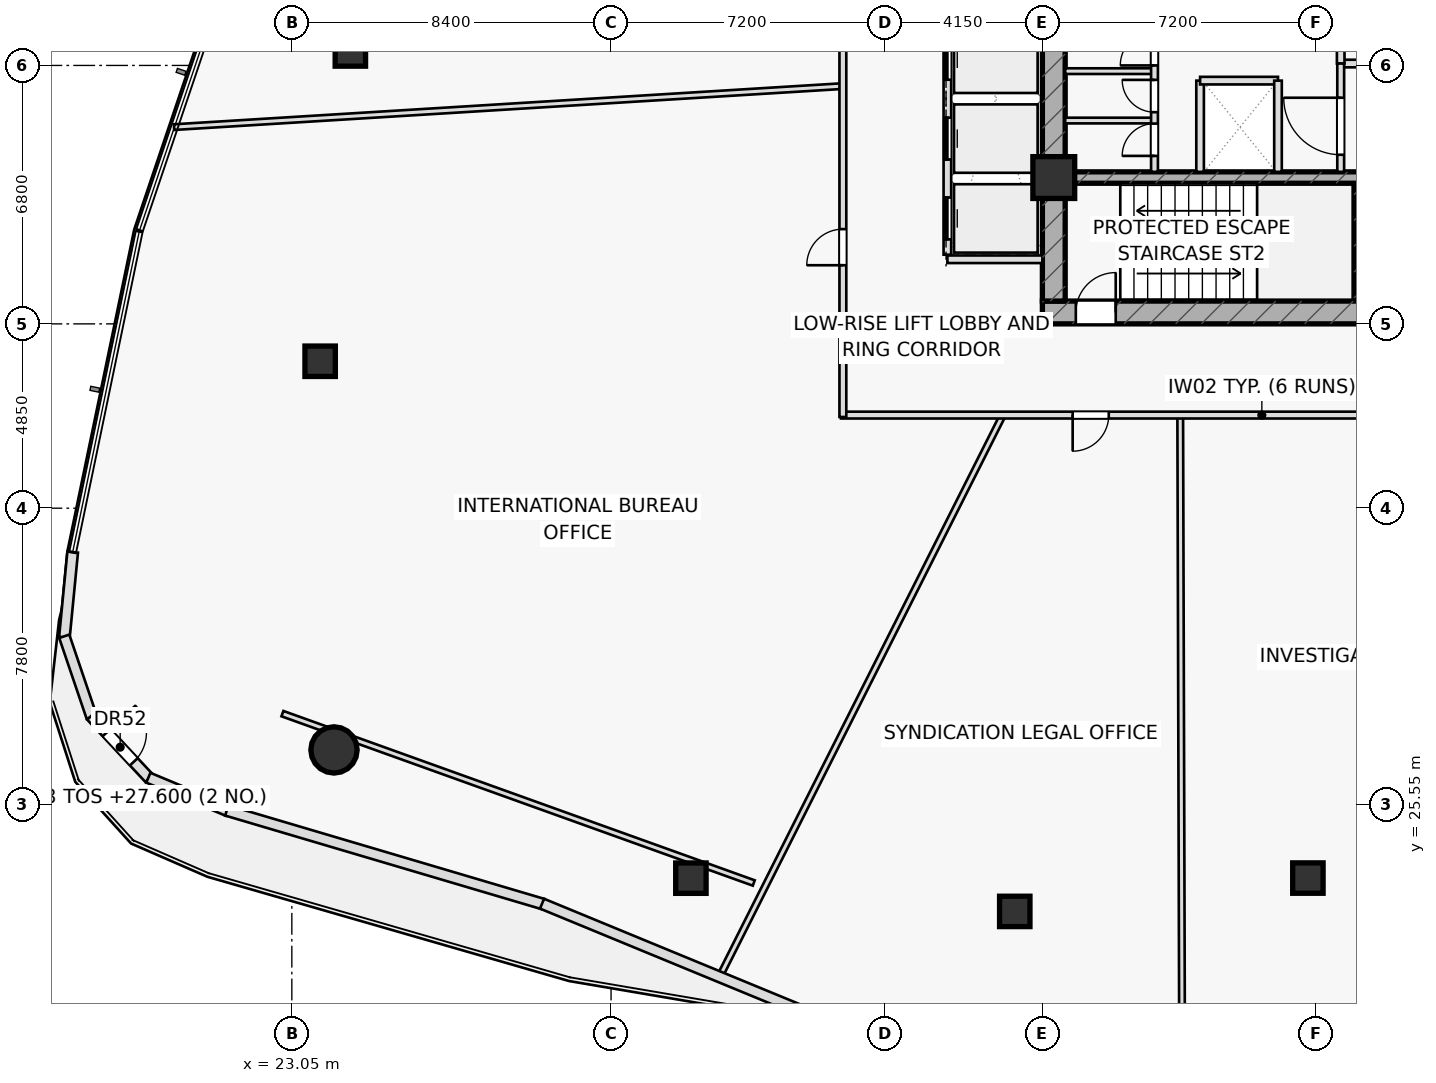
"""IFC4 building model, lengths in metres.
Left out: names, types, materials, properties, quantities, classifications, styles, units other than length and angle.
Written with IfcOpenShell. Run it as: python <this file> out.ifc"""

import sys

from ifc_helpers import new_model, si_unit, direction, frame, frame_2d, origin, origin_2d, place, context, subcontext, project, spatial, rectangle, hollow_rectangle, hollow_circle, extrude, element, fill, save


model = new_model("IFC4")
c1 = context("Model", 3, precision=1e-05, world=origin(), true_north=direction((0.0, 1.0)))
c2 = subcontext(c1, "Body", "Model", "MODEL_VIEW")
j1 = project(units=[si_unit("LENGTHUNIT", "METRE"), si_unit("PLANEANGLEUNIT", "RADIAN")], contexts=[c1])
p1 = place(None, origin())
s1 = spatial("IfcSite", under=j1, at=p1, CompositionType="ELEMENT")
p2 = place(p1, origin())
s2 = spatial("IfcBuilding", under=s1, at=p2, CompositionType="ELEMENT")
p3 = place(p2, frame((0.0, 0.0, 27.6)))
s3 = spatial("IfcBuildingStorey", under=s2, at=p3, CompositionType="ELEMENT", Elevation=27.6)
p4 = place(p3, frame((51.11, 38.8, 0.0), z_axis=(0.0, 0.0, 1.0), x_axis=(0.0, 1.0, 0.0)))
e1 = element("IfcWall", 1, at=p4, inside=s3, PredefinedType="SHEAR", context=c2, shape_type="SweptSolid", body=[
    extrude(rectangle(XDim=3.1, YDim=0.22, at=frame_2d((1.55, 0.0))), origin(), (0.0, 0.0, 1.0), 3.6),
])
p5 = place(p3, frame((42.8, 38.5, 0.0), z_axis=(0.0, 0.0, 1.0), x_axis=(1.0, 0.0, 0.0)))
e2 = element("IfcWall", 2, at=p5, inside=s3, PredefinedType="SHEAR", context=c2, shape_type="SweptSolid", body=[
    extrude(rectangle(XDim=14.4, YDim=0.6, at=frame_2d((7.2, 0.0))), origin(), (0.0, 0.0, 1.0), 3.6),
])
p6 = place(p5, frame((0.88, 0.0, 0.0)))
e3 = element("IfcOpeningElement", 3, at=p6, cuts=e2, PredefinedType="OPENING", context=c2, shape_type="SweptSolid", body=[
    extrude(rectangle(XDim=1.05, YDim=2.2, at=frame_2d((0.525, 1.1))), frame((0.0, 0.31, 0.0), z_axis=(0.0, -1.0, 0.0), x_axis=(1.0, 0.0, 0.0)), (0.0, 0.0, 1.0), 0.62),
])
p7 = place(p3, frame((43.1, 38.8, 0.0), z_axis=(0.0, 0.0, 1.0), x_axis=(0.0, 1.0, 0.0)))
e4 = element("IfcWall", 4, at=p7, inside=s3, PredefinedType="SHEAR", context=c2, shape_type="SweptSolid", body=[
    extrude(rectangle(XDim=12.4, YDim=0.6, at=frame_2d((6.2, 0.0))), origin(), (0.0, 0.0, 1.0), 3.6),
])
p8 = place(p3, frame((43.4, 42.05, 0.0), z_axis=(0.0, 0.0, 1.0), x_axis=(1.0, 0.0, 0.0)))
e5 = element("IfcWall", 5, at=p8, inside=s3, PredefinedType="SHEAR", context=c2, shape_type="SweptSolid", body=[
    extrude(rectangle(XDim=13.2, YDim=0.3, at=frame_2d((6.6, 0.0))), origin(), (0.0, 0.0, 1.0), 3.6),
])
p9 = place(p3, frame((43.1, 42.05, 0.0), z_axis=(0.0, 0.0, 1.0), x_axis=(1.0, 0.0, 0.0)))
e6 = element("IfcColumn", 6, at=p9, inside=s3, PredefinedType="COLUMN", context=c2, shape_type="SweptSolid", body=[
    extrude(rectangle(XDim=1.1, YDim=1.1, at=origin_2d()), origin(), (0.0, 0.0, 1.0), 3.6),
])
for number, where, z_axis, x_axis in (
    (7, (24.59, 45.381, 0.0), (0.0, 0.0, 1.0), (1.0, 0.0, 0.0)),
    (8, (23.795, 37.216, 0.0), (0.0, 0.0, 1.0), (1.0, 0.0, 0.0)),
):
    element("IfcColumn", number, at=place(p3, frame(where, z_axis=z_axis, x_axis=x_axis)), inside=s3, PredefinedType="COLUMN", context=c2, shape_type="SweptSolid", body=[
        extrude(hollow_rectangle(XDim=0.8, YDim=0.8, WallThickness=0.045, at=origin_2d()), origin(), (0.0, 0.0, 1.0), 3.6),
    ])
p10 = place(p3, frame((24.159, 26.99, 0.0), z_axis=(0.0, 0.0, 1.0), x_axis=(1.0, 0.0, 0.0)))
e9 = element("IfcColumn", 9, at=p10, inside=s3, PredefinedType="COLUMN", context=c2, shape_type="SweptSolid", body=[
    extrude(hollow_circle(Radius=0.61, WallThickness=0.05, at=origin_2d()), origin(), (0.0, 0.0, 1.0), 3.6),
])
for number, where, z_axis, x_axis in (
    (10, (33.551, 23.615, 0.0), (0.0, 0.0, 1.0), (1.0, 0.0, 0.0)),
    (11, (42.073, 22.74, 0.0), (0.0, 0.0, 1.0), (1.0, 0.0, 0.0)),
    (12, (49.787, 23.618, 0.0), (0.0, 0.0, 1.0), (1.0, 0.0, 0.0)),
):
    element("IfcColumn", number, at=place(p3, frame(where, z_axis=z_axis, x_axis=x_axis)), inside=s3, PredefinedType="COLUMN", context=c2, shape_type="SweptSolid", body=[
        extrude(hollow_rectangle(XDim=0.8, YDim=0.8, WallThickness=0.045, at=origin_2d()), origin(), (0.0, 0.0, 1.0), 3.6),
    ])
p11 = place(p3, frame((40.3, 39.9, 0.0), z_axis=(0.0, 0.0, 1.0), x_axis=(1.0, 0.0, 0.0)))
e13 = element("IfcWall", 13, at=p11, inside=s3, PredefinedType="PARTITIONING", context=c2, shape_type="SweptSolid", body=[
    extrude(rectangle(XDim=2.5, YDim=0.2, at=frame_2d((1.25, 0.0))), origin(), (0.0, 0.0, 1.0), 3.6),
])
p12 = place(p3, frame((46.95, 42.2, 0.0), z_axis=(0.0, 0.0, 1.0), x_axis=(0.0, 1.0, 0.0)))
e14 = element("IfcWall", 14, at=p12, inside=s3, PredefinedType="PARTITIONING", context=c2, shape_type="SweptSolid", body=[
    extrude(rectangle(XDim=2.4, YDim=0.2, at=frame_2d((1.2, 0.0))), origin(), (0.0, 0.0, 1.0), 3.6),
])
p13 = place(p3, frame((46.95, 44.6, 0.0), z_axis=(0.0, 0.0, 1.0), x_axis=(1.0, 0.0, 0.0)))
e15 = element("IfcWall", 15, at=p13, inside=s3, PredefinedType="PARTITIONING", context=c2, shape_type="SweptSolid", body=[
    extrude(rectangle(XDim=2.05, YDim=0.2, at=frame_2d((1.025, 0.0))), origin(), (0.0, 0.0, 1.0), 3.6),
])
p14 = place(p3, frame((50.65, 45.05, 0.0), z_axis=(0.0, 0.0, 1.0), x_axis=(1.0, 0.0, 0.0)))
e16 = element("IfcWall", 16, at=p14, inside=s3, PredefinedType="PARTITIONING", context=c2, shape_type="SweptSolid", body=[
    extrude(rectangle(XDim=5.95, YDim=0.2, at=frame_2d((2.975, 0.0))), origin(), (0.0, 0.0, 1.0), 3.6),
])
p15 = place(p14, frame((1.35, 0.0, 0.0)))
e17 = element("IfcOpeningElement", 17, at=p15, cuts=e16, PredefinedType="OPENING", context=c2, shape_type="SweptSolid", body=[
    extrude(rectangle(XDim=1.5, YDim=2.2, at=frame_2d((0.75, 1.1))), frame((0.0, 0.11, 0.0), z_axis=(0.0, -1.0, 0.0), x_axis=(1.0, 0.0, 0.0)), (0.0, 0.0, 1.0), 0.22),
])
p16 = place(p3, frame((50.65, 45.05, 0.0), z_axis=(0.0, 0.0, 1.0), x_axis=(0.0, 1.0, 0.0)))
e18 = element("IfcWall", 18, at=p16, inside=s3, PredefinedType="PARTITIONING", context=c2, shape_type="SweptSolid", body=[
    extrude(rectangle(XDim=2.75, YDim=0.2, at=frame_2d((1.375, 0.0))), origin(), (0.0, 0.0, 1.0), 3.6),
])
p17 = place(p3, frame((50.65, 42.2, 0.0), z_axis=(0.0, 0.0, 1.0), x_axis=(0.0, 1.0, 0.0)))
e19 = element("IfcWall", 19, at=p17, inside=s3, PredefinedType="PARTITIONING", context=c2, shape_type="SweptSolid", body=[
    extrude(rectangle(XDim=2.85, YDim=0.18, at=frame_2d((1.425, 0.0))), origin(), (0.0, 0.0, 1.0), 3.6),
])
p18 = place(p17, frame((0.45, 0.0, 0.0)))
e20 = element("IfcOpeningElement", 20, at=p18, cuts=e19, PredefinedType="OPENING", context=c2, shape_type="SweptSolid", body=[
    extrude(rectangle(XDim=1.5, YDim=2.2, at=frame_2d((0.75, 1.1))), frame((0.0, 0.1, 0.0), z_axis=(0.0, -1.0, 0.0), x_axis=(1.0, 0.0, 0.0)), (0.0, 0.0, 1.0), 0.2),
])
for number, where, z_axis, x_axis in (
    (21, (43.4, 43.55, 0.0), (0.0, 0.0, 1.0), (1.0, 0.0, 0.0)),
    (22, (43.4, 44.85, 0.0), (0.0, 0.0, 1.0), (1.0, 0.0, 0.0)),
):
    element("IfcWall", number, at=place(p3, frame(where, z_axis=z_axis, x_axis=x_axis)), inside=s3, PredefinedType="PARTITIONING", context=c2, shape_type="SweptSolid", body=[
        extrude(rectangle(XDim=2.35, YDim=0.15, at=frame_2d((1.175, 0.0))), origin(), (0.0, 0.0, 1.0), 3.6),
    ])
p19 = place(p3, frame((45.75, 42.2, 0.0), z_axis=(0.0, 0.0, 1.0), x_axis=(0.0, 1.0, 0.0)))
e23 = element("IfcWall", 23, at=p19, inside=s3, PredefinedType="PARTITIONING", context=c2, shape_type="SweptSolid", body=[
    extrude(rectangle(XDim=5.6, YDim=0.18, at=frame_2d((2.8, 0.0))), origin(), (0.0, 0.0, 1.0), 3.6),
])
p20 = place(p19, frame((0.42, 0.0, 0.0)))
e24 = element("IfcOpeningElement", 24, at=p20, cuts=e23, PredefinedType="OPENING", context=c2, shape_type="SweptSolid", body=[
    extrude(rectangle(XDim=0.85, YDim=2.05, at=frame_2d((0.425, 1.025))), frame((0.0, 0.1, 0.0), z_axis=(0.0, -1.0, 0.0), x_axis=(1.0, 0.0, 0.0)), (0.0, 0.0, 1.0), 0.2),
])
p21 = place(p19, frame((1.57, 0.0, 0.0)))
e25 = element("IfcOpeningElement", 25, at=p21, cuts=e23, PredefinedType="OPENING", context=c2, shape_type="SweptSolid", body=[
    extrude(rectangle(XDim=0.85, YDim=2.05, at=frame_2d((0.425, 1.025))), frame((0.0, 0.1, 0.0), z_axis=(0.0, -1.0, 0.0), x_axis=(1.0, 0.0, 0.0)), (0.0, 0.0, 1.0), 0.2),
])
p22 = place(p19, frame((2.8, 0.0, 0.0)))
e26 = element("IfcOpeningElement", 26, at=p22, cuts=e23, PredefinedType="OPENING", context=c2, shape_type="SweptSolid", body=[
    extrude(rectangle(XDim=0.9, YDim=2.05, at=frame_2d((0.45, 1.025))), frame((0.0, 0.1, 0.0), z_axis=(0.0, -1.0, 0.0), x_axis=(1.0, 0.0, 0.0)), (0.0, 0.0, 1.0), 0.2),
])
p23 = place(p3, frame((22.802, 27.945, 0.0), z_axis=(0.0, 0.0, 1.0), x_axis=(0.941102349209, -0.338121824662, 0.0)))
e27 = element("IfcWall", 27, at=p23, inside=s3, PredefinedType="PARTITIONING", context=c2, shape_type="SweptSolid", body=[
    extrude(rectangle(XDim=13.18, YDim=0.15, at=frame_2d((6.59, 0.0))), origin(), (0.0, 0.0, 1.0), 2.925),
])
p24 = place(p3, frame((37.55, 44.457, 0.0), z_axis=(0.0, 0.0, 1.0), x_axis=(-0.998123200765, -0.061237864879, 0.0)))
e28 = element("IfcWall", 28, at=p24, inside=s3, PredefinedType="PARTITIONING", context=c2, shape_type="SweptSolid", body=[
    extrude(rectangle(XDim=17.634, YDim=0.15, at=frame_2d((8.817, 0.0))), origin(), (0.0, 0.0, 1.0), 2.975),
])
p25 = place(p3, frame((41.76, 35.8, 0.0), z_axis=(0.0, 0.0, 1.0), x_axis=(-0.450299979732, -0.892877331022, 0.0)))
e29 = element("IfcWall", 29, at=p25, inside=s3, PredefinedType="PARTITIONING", context=c2, shape_type="SweptSolid", body=[
    extrude(rectangle(XDim=16.566, YDim=0.15, at=frame_2d((8.283, 0.0))), origin(), (0.0, 0.0, 1.0), 2.975),
])
p26 = place(p3, frame((46.427, 35.8, 0.0), z_axis=(0.0, 0.0, 1.0), x_axis=(0.002955422619, -0.999995632729, 0.0)))
e30 = element("IfcWall", 30, at=p26, inside=s3, PredefinedType="PARTITIONING", context=c2, shape_type="SweptSolid", body=[
    extrude(rectangle(XDim=16.769, YDim=0.15, at=frame_2d((8.385, 0.0))), origin(), (0.0, 0.0, 1.0), 2.925),
])
p27 = place(p3, frame((59.65, 35.8, 0.0), z_axis=(0.0, 0.0, 1.0), x_axis=(-1.0, 0.0, 0.0)))
e31 = element("IfcWall", 31, at=p27, inside=s3, PredefinedType="PARTITIONING", context=c2, shape_type="SweptSolid", body=[
    extrude(rectangle(XDim=22.15, YDim=0.18, at=frame_2d((11.075, 0.0))), origin(), (0.0, 0.0, 1.0), 2.925),
])
p28 = place(p27, frame((6.254, 0.0, 0.0)))
e32 = element("IfcOpeningElement", 32, at=p28, cuts=e31, PredefinedType="OPENING", context=c2, shape_type="SweptSolid", body=[
    extrude(rectangle(XDim=0.95, YDim=2.05, at=frame_2d((0.475, 1.025))), frame((0.0, 0.1, 0.0), z_axis=(0.0, -1.0, 0.0), x_axis=(1.0, 0.0, 0.0)), (0.0, 0.0, 1.0), 0.2),
])
p29 = place(p27, frame((15.103, 0.0, 0.0)))
e33 = element("IfcOpeningElement", 33, at=p29, cuts=e31, PredefinedType="OPENING", context=c2, shape_type="SweptSolid", body=[
    extrude(rectangle(XDim=0.95, YDim=2.05, at=frame_2d((0.475, 1.025))), frame((0.0, 0.1, 0.0), z_axis=(0.0, -1.0, 0.0), x_axis=(1.0, 0.0, 0.0)), (0.0, 0.0, 1.0), 0.2),
])
p30 = place(p3, frame((37.55, 35.75, 0.0), z_axis=(0.0, 0.0, 1.0), x_axis=(0.0, 1.0, 0.0)))
e34 = element("IfcWall", 34, at=p30, inside=s3, PredefinedType="PARTITIONING", context=c2, shape_type="SweptSolid", body=[
    extrude(rectangle(XDim=12.75, YDim=0.18, at=frame_2d((6.375, 0.0))), origin(), (0.0, 0.0, 1.0), 2.925),
])
p31 = place(p30, frame((3.993, 0.0, 0.0)))
e35 = element("IfcOpeningElement", 35, at=p31, cuts=e34, PredefinedType="OPENING", context=c2, shape_type="SweptSolid", body=[
    extrude(rectangle(XDim=0.95, YDim=2.05, at=frame_2d((0.475, 1.025))), frame((0.0, 0.1, 0.0), z_axis=(0.0, -1.0, 0.0), x_axis=(1.0, 0.0, 0.0)), (0.0, 0.0, 1.0), 0.2),
])
p32 = place(p30, frame((10.132, 0.0, 0.0)))
e36 = element("IfcOpeningElement", 36, at=p32, cuts=e34, PredefinedType="OPENING", context=c2, shape_type="SweptSolid", body=[
    extrude(rectangle(XDim=0.95, YDim=2.05, at=frame_2d((0.475, 1.025))), frame((0.0, 0.1, 0.0), z_axis=(0.0, -1.0, 0.0), x_axis=(1.0, 0.0, 0.0)), (0.0, 0.0, 1.0), 0.2),
])
p33 = place(p3, frame((17.283, 32.194, 0.0), z_axis=(0.0, 0.0, 1.0), x_axis=(-0.096704884941, -0.995313099094, 0.0)))
e37 = element("IfcWall", 37, at=p33, inside=s3, PredefinedType="STANDARD", context=c2, shape_type="SweptSolid", body=[
    extrude(rectangle(XDim=2.254, YDim=0.28, at=frame_2d((1.127, 0.0))), origin(), (0.0, 0.0, 1.0), 3.6),
])
p34 = place(p3, frame((17.062, 29.979, 0.0), z_axis=(0.0, 0.0, 1.0), x_axis=(0.321447996394, -0.946927233537, 0.0)))
e38 = element("IfcWall", 38, at=p34, inside=s3, PredefinedType="STANDARD", context=c2, shape_type="SweptSolid", body=[
    extrude(rectangle(XDim=2.243, YDim=0.28, at=frame_2d((1.122, 0.0))), origin(), (0.0, 0.0, 1.0), 3.6),
])
p35 = place(p3, frame((17.767, 27.881, 0.0), z_axis=(0.0, 0.0, 1.0), x_axis=(0.682698223225, -0.730700442045, 0.0)))
e39 = element("IfcWall", 39, at=p35, inside=s3, PredefinedType="STANDARD", context=c2, shape_type="SweptSolid", body=[
    extrude(rectangle(XDim=2.243, YDim=0.28, at=frame_2d((1.122, 0.0))), origin(), (0.0, 0.0, 1.0), 3.6),
])
p36 = place(p35, frame((0.596, 0.0, 0.0)))
e40 = element("IfcOpeningElement", 40, at=p36, cuts=e39, PredefinedType="OPENING", context=c2, shape_type="SweptSolid", body=[
    extrude(rectangle(XDim=1.05, YDim=2.2, at=frame_2d((0.525, 1.1))), frame((0.0, 0.15, 0.0), z_axis=(0.0, -1.0, 0.0), x_axis=(1.0, 0.0, 0.0)), (0.0, 0.0, 1.0), 0.3),
])
p37 = place(p3, frame((19.274, 26.259, 0.0), z_axis=(0.0, 0.0, 1.0), x_axis=(0.92284399396, -0.385173938387, 0.0)))
e41 = element("IfcWall", 41, at=p37, inside=s3, PredefinedType="STANDARD", context=c2, shape_type="SweptSolid", body=[
    extrude(rectangle(XDim=2.265, YDim=0.28, at=frame_2d((1.133, 0.0))), origin(), (0.0, 0.0, 1.0), 3.6),
])
p38 = place(p3, frame((21.337, 25.396, 0.0), z_axis=(0.0, 0.0, 1.0), x_axis=(0.958933609462, -0.283630627127, 0.0)))
e42 = element("IfcWall", 42, at=p38, inside=s3, PredefinedType="STANDARD", context=c2, shape_type="SweptSolid", body=[
    extrude(rectangle(XDim=8.682, YDim=0.28, at=frame_2d((4.341, 0.0))), origin(), (0.0, 0.0, 1.0), 3.6),
])
p39 = place(p3, frame((29.634, 22.944, 0.0), z_axis=(0.0, 0.0, 1.0), x_axis=(0.924511602603, -0.381153901532, 0.0)))
e43 = element("IfcWall", 43, at=p39, inside=s3, PredefinedType="STANDARD", context=c2, shape_type="SweptSolid", body=[
    extrude(rectangle(XDim=9.267, YDim=0.28, at=frame_2d((4.634, 0.0))), origin(), (0.0, 0.0, 1.0), 3.6),
])
p40 = place(p3, frame((40.3, 40.02, 0.0), z_axis=(0.0, 0.0, 1.0), x_axis=(0.0, 1.0, 0.0)))
e44 = element("IfcWall", 44, at=p40, inside=s3, PredefinedType="PARTITIONING", context=c2, shape_type="SweptSolid", body=[
    extrude(rectangle(XDim=8.21, YDim=0.2, at=frame_2d((4.105, 0.0))), origin(), (0.0, 0.0, 1.0), 3.6),
])
p41 = place(p40, frame((0.405, 0.0, 0.0)))
e45 = element("IfcOpeningElement", 45, at=p41, cuts=e44, PredefinedType="OPENING", context=c2, shape_type="SweptSolid", body=[
    extrude(rectangle(XDim=1.1, YDim=2.15, at=frame_2d((0.55, 1.075))), frame((0.0, 0.11, 0.0), z_axis=(0.0, -1.0, 0.0), x_axis=(1.0, 0.0, 0.0)), (0.0, 0.0, 1.0), 0.22),
])
p42 = place(p40, frame((2.505, 0.0, 0.0)))
e46 = element("IfcOpeningElement", 46, at=p42, cuts=e44, PredefinedType="OPENING", context=c2, shape_type="SweptSolid", body=[
    extrude(rectangle(XDim=1.1, YDim=2.15, at=frame_2d((0.55, 1.075))), frame((0.0, 0.11, 0.0), z_axis=(0.0, -1.0, 0.0), x_axis=(1.0, 0.0, 0.0)), (0.0, 0.0, 1.0), 0.22),
])
p43 = place(p40, frame((4.605, 0.0, 0.0)))
e47 = element("IfcOpeningElement", 47, at=p43, cuts=e44, PredefinedType="OPENING", context=c2, shape_type="SweptSolid", body=[
    extrude(rectangle(XDim=1.1, YDim=2.15, at=frame_2d((0.55, 1.075))), frame((0.0, 0.11, 0.0), z_axis=(0.0, -1.0, 0.0), x_axis=(1.0, 0.0, 0.0)), (0.0, 0.0, 1.0), 0.22),
])
p44 = place(p40, frame((6.705, 0.0, 0.0)))
e48 = element("IfcOpeningElement", 48, at=p44, cuts=e44, PredefinedType="OPENING", context=c2, shape_type="SweptSolid", body=[
    extrude(rectangle(XDim=1.1, YDim=2.15, at=frame_2d((0.55, 1.075))), frame((0.0, 0.11, 0.0), z_axis=(0.0, -1.0, 0.0), x_axis=(1.0, 0.0, 0.0)), (0.0, 0.0, 1.0), 0.22),
])
p45 = place(p3, frame((49.0, 42.2, 0.0), z_axis=(0.0, 0.0, 1.0), x_axis=(0.0, 1.0, 0.0)))
e49 = element("IfcWall", 49, at=p45, inside=s3, PredefinedType="PARTITIONING", context=c2, shape_type="SweptSolid", body=[
    extrude(rectangle(XDim=2.4, YDim=0.2, at=frame_2d((1.2, 0.0))), origin(), (0.0, 0.0, 1.0), 3.6),
])
p46 = place(p6, origin())
e50 = element("IfcDoor", 50, at=p46, inside=s3, OperationType="SINGLE_SWING_RIGHT", PredefinedType="DOOR", context=c2, shape_type="SweptSolid", body=[
    extrude(rectangle(XDim=1.05, YDim=2.2, at=frame_2d((0.525, 1.1))), frame((0.0, 0.025, 0.0), z_axis=(0.0, -1.0, 0.0), x_axis=(1.0, 0.0, 0.0)), (0.0, 0.0, 1.0), 0.05),
])
fill(e3, e50)
p47 = place(p18, origin())
e51 = element("IfcDoor", 51, at=p47, inside=s3, OperationType="SINGLE_SWING_RIGHT", PredefinedType="DOOR", context=c2, shape_type="SweptSolid", body=[
    extrude(rectangle(XDim=1.5, YDim=2.2, at=frame_2d((0.75, 1.1))), frame((0.0, 0.025, 0.0), z_axis=(0.0, -1.0, 0.0), x_axis=(1.0, 0.0, 0.0)), (0.0, 0.0, 1.0), 0.05),
])
fill(e20, e51)
p48 = place(p20, origin())
e52 = element("IfcDoor", 52, at=p48, inside=s3, OperationType="SINGLE_SWING_LEFT", PredefinedType="DOOR", context=c2, shape_type="SweptSolid", body=[
    extrude(rectangle(XDim=0.85, YDim=2.05, at=frame_2d((0.425, 1.025))), frame((0.0, 0.025, 0.0), z_axis=(0.0, -1.0, 0.0), x_axis=(1.0, 0.0, 0.0)), (0.0, 0.0, 1.0), 0.05),
])
fill(e24, e52)
p49 = place(p21, origin())
e53 = element("IfcDoor", 53, at=p49, inside=s3, OperationType="SINGLE_SWING_RIGHT", PredefinedType="DOOR", context=c2, shape_type="SweptSolid", body=[
    extrude(rectangle(XDim=0.85, YDim=2.05, at=frame_2d((0.425, 1.025))), frame((0.0, 0.025, 0.0), z_axis=(0.0, -1.0, 0.0), x_axis=(1.0, 0.0, 0.0)), (0.0, 0.0, 1.0), 0.05),
])
fill(e25, e53)
p50 = place(p22, origin())
e54 = element("IfcDoor", 54, at=p50, inside=s3, OperationType="SINGLE_SWING_LEFT", PredefinedType="DOOR", context=c2, shape_type="SweptSolid", body=[
    extrude(rectangle(XDim=0.9, YDim=2.05, at=frame_2d((0.45, 1.025))), frame((0.0, 0.025, 0.0), z_axis=(0.0, -1.0, 0.0), x_axis=(1.0, 0.0, 0.0)), (0.0, 0.0, 1.0), 0.05),
])
fill(e26, e54)
p51 = place(p29, origin())
e55 = element("IfcDoor", 55, at=p51, inside=s3, OperationType="SINGLE_SWING_RIGHT", PredefinedType="DOOR", context=c2, shape_type="SweptSolid", body=[
    extrude(rectangle(XDim=0.95, YDim=2.05, at=frame_2d((0.475, 1.025))), frame((0.0, 0.025, 0.0), z_axis=(0.0, -1.0, 0.0), x_axis=(1.0, 0.0, 0.0)), (0.0, 0.0, 1.0), 0.05),
])
fill(e33, e55)
p52 = place(p31, origin())
e56 = element("IfcDoor", 56, at=p52, inside=s3, OperationType="SINGLE_SWING_LEFT", PredefinedType="DOOR", context=c2, shape_type="SweptSolid", body=[
    extrude(rectangle(XDim=0.95, YDim=2.05, at=frame_2d((0.475, 1.025))), frame((0.0, 0.025, 0.0), z_axis=(0.0, -1.0, 0.0), x_axis=(1.0, 0.0, 0.0)), (0.0, 0.0, 1.0), 0.05),
])
fill(e35, e56)
p53 = place(p36, origin())
e57 = element("IfcDoor", 57, at=p53, inside=s3, OperationType="SINGLE_SWING_LEFT", PredefinedType="DOOR", context=c2, shape_type="SweptSolid", body=[
    extrude(rectangle(XDim=1.05, YDim=2.2, at=frame_2d((0.525, 1.1))), frame((0.0, 0.025, 0.0), z_axis=(0.0, -1.0, 0.0), x_axis=(1.0, 0.0, 0.0)), (0.0, 0.0, 1.0), 0.05),
])
fill(e40, e57)
p54 = place(p41, origin())
e58 = element("IfcDoor", 58, at=p54, inside=s3, OperationType="SLIDING_TO_LEFT", PredefinedType="DOOR", context=c2, shape_type="SweptSolid", body=[
    extrude(rectangle(XDim=1.1, YDim=2.15, at=frame_2d((0.55, 1.075))), frame((0.0, 0.025, 0.0), z_axis=(0.0, -1.0, 0.0), x_axis=(1.0, 0.0, 0.0)), (0.0, 0.0, 1.0), 0.05),
])
fill(e45, e58)
p55 = place(p42, origin())
e59 = element("IfcDoor", 59, at=p55, inside=s3, OperationType="SLIDING_TO_RIGHT", PredefinedType="DOOR", context=c2, shape_type="SweptSolid", body=[
    extrude(rectangle(XDim=1.1, YDim=2.15, at=frame_2d((0.55, 1.075))), frame((0.0, 0.025, 0.0), z_axis=(0.0, -1.0, 0.0), x_axis=(1.0, 0.0, 0.0)), (0.0, 0.0, 1.0), 0.05),
])
fill(e46, e59)
p56 = place(p43, origin())
e60 = element("IfcDoor", 60, at=p56, inside=s3, OperationType="SLIDING_TO_LEFT", PredefinedType="DOOR", context=c2, shape_type="SweptSolid", body=[
    extrude(rectangle(XDim=1.1, YDim=2.15, at=frame_2d((0.55, 1.075))), frame((0.0, 0.025, 0.0), z_axis=(0.0, -1.0, 0.0), x_axis=(1.0, 0.0, 0.0)), (0.0, 0.0, 1.0), 0.05),
])
fill(e47, e60)
save(model, sys.argv[1])
